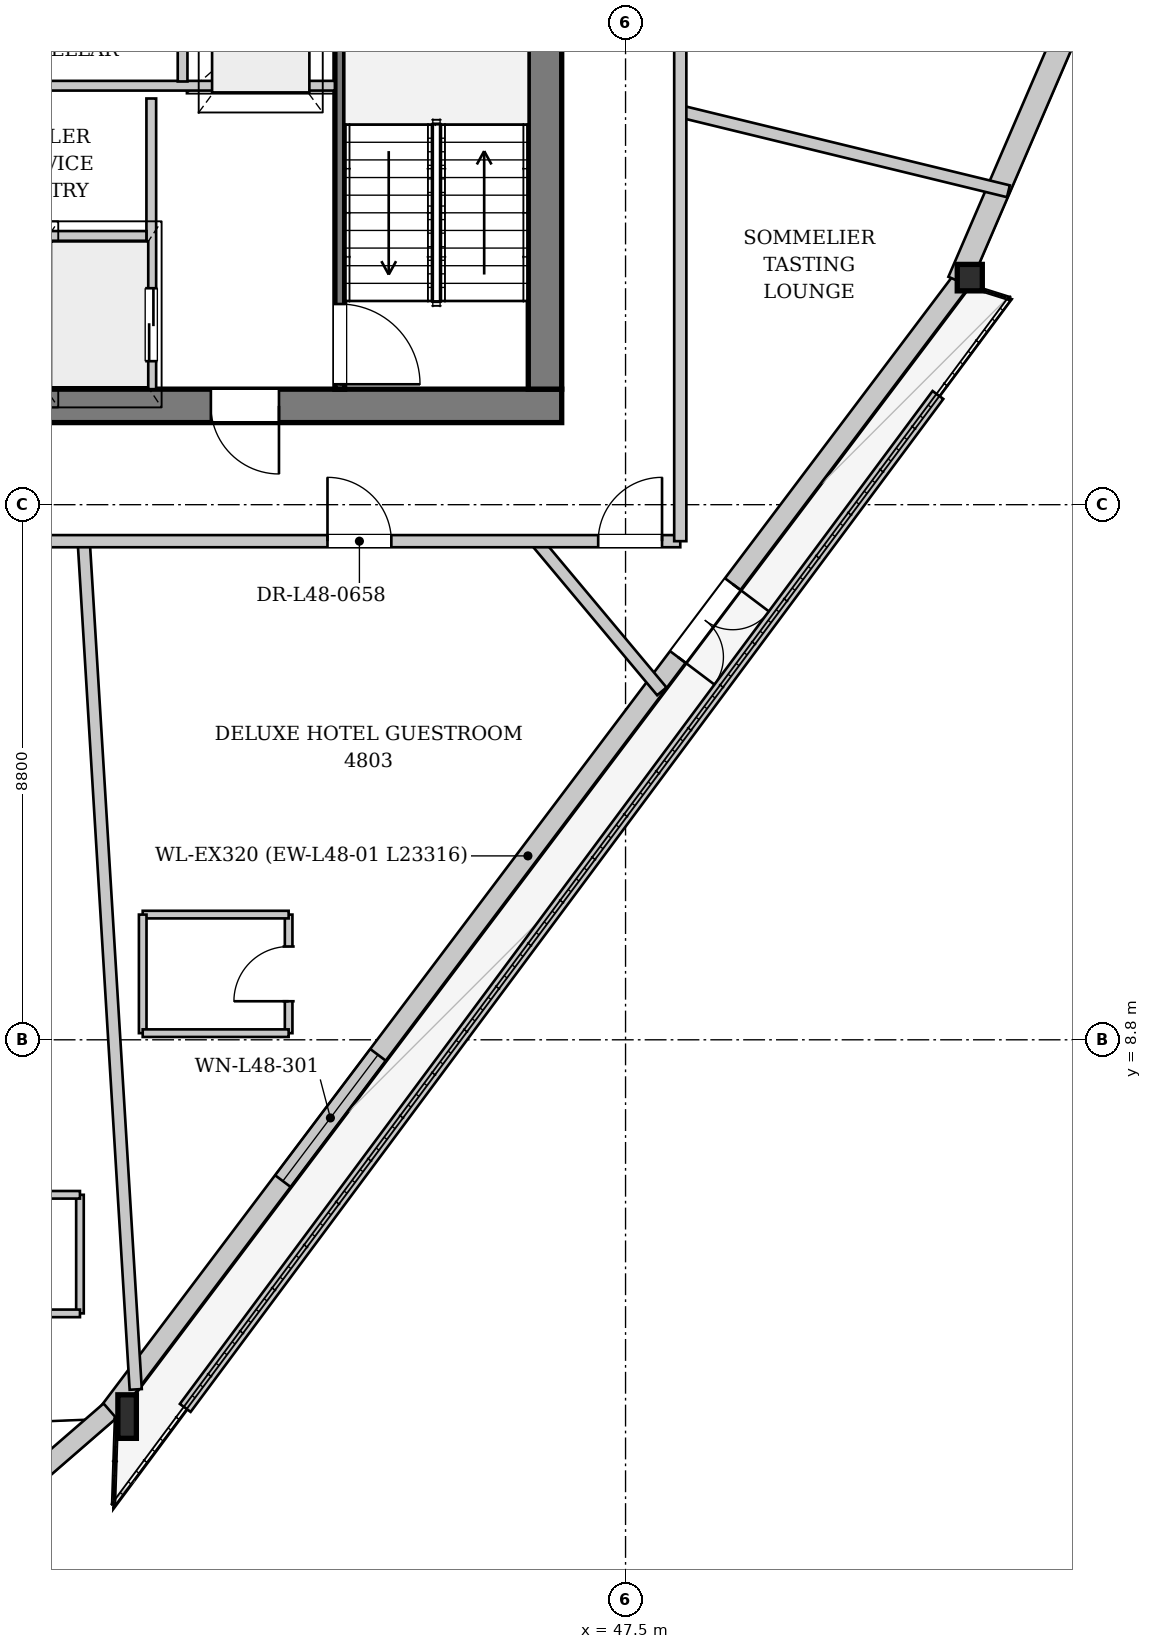
"""IFC4 building model, lengths in metres.
Left out: names, types, materials, properties, quantities, classifications, styles, units other than length and angle.
Written with IfcOpenShell. Run it as: python <this file> out.ifc"""

import sys

from ifc_helpers import new_model, si_unit, direction, frame, frame_2d, origin, origin_2d, place, context, subcontext, project, spatial, rectangle, i_section, extrude, source, transform, mapped, element, fill, save


model = new_model("IFC4")
c1 = context("Model", 3, precision=1e-05, world=origin(), true_north=direction((0.0, 1.0)))
c2 = subcontext(c1, "Body", "Model", "MODEL_VIEW")
j1 = project(units=[si_unit("LENGTHUNIT", "METRE"), si_unit("PLANEANGLEUNIT", "RADIAN")], contexts=[c1])
p1 = place(None, origin())
s1 = spatial("IfcSite", under=j1, at=p1, CompositionType="ELEMENT")
p2 = place(p1, origin())
s2 = spatial("IfcBuilding", under=s1, at=p2, CompositionType="ELEMENT")
p3 = place(p2, frame((0.0, 0.0, 182.1)))
s3 = spatial("IfcBuildingStorey", under=s2, at=p3, CompositionType="ELEMENT", Elevation=182.1)
m1 = source(origin(), c2, "Body", "SweptSolid", [
    extrude(i_section(OverallWidth=0.304, OverallDepth=0.716, WebThickness=0.021, FlangeThickness=0.04, at=origin_2d()), origin(), (0.0, 0.0, 1.0), 3.404),
])
p4 = place(p3, frame((39.125, 2.577, 0.0), z_axis=(0.104354873032, 0.01549185744, 0.994419460202), x_axis=(-0.146844314237, 0.989159616733, 0.0)))
e1 = element("IfcColumn", 1, at=p4, inside=s3, PredefinedType="COLUMN", context=c2, shape_type="MappedRepresentation", body=[
    mapped(m1, transform((0.0, 0.0, 0.0), x_axis=(1.0, 0.0, 0.0), y_axis=(0.0, 1.0, 0.0), z_axis=(0.0, 0.0, 1.0), scale=1.0)),
])
m2 = source(origin(), c2, "Body", "SweptSolid", [
    extrude(i_section(OverallWidth=0.412, OverallDepth=0.435, WebThickness=0.031, FlangeThickness=0.05, at=origin_2d()), origin(), (0.0, 0.0, 1.0), 3.396),
])
p5 = place(p3, frame((53.159, 21.197, 0.0), z_axis=(0.00136590655, 0.080516596624, 0.996752332311), x_axis=(-0.999856137556, 0.016961845191, 0.0)))
e2 = element("IfcColumn", 2, at=p5, inside=s3, PredefinedType="COLUMN", context=c2, shape_type="MappedRepresentation", body=[
    mapped(m2, transform((0.0, 0.0, 0.0), x_axis=(1.0, 0.0, 0.0), y_axis=(0.0, 1.0, 0.0), z_axis=(0.0, 0.0, 1.0), scale=1.0)),
])
p6 = place(p3, frame((53.031, 21.293, 0.0), z_axis=(0.0, 0.0, 1.0), x_axis=(-0.601886435851, -0.798581691713, 0.0)))
e3 = element("IfcWall", 3, at=p6, inside=s3, PredefinedType="SOLIDWALL", context=c2, shape_type="SweptSolid", body=[
    extrude(rectangle(XDim=23.316, YDim=0.32, at=frame_2d((11.658, 0.0))), origin(), (0.0, 0.0, 1.0), 2.722),
])
p7 = place(p6, frame((6.261, 0.0, 0.0)))
e4 = element("IfcOpeningElement", 4, at=p7, cuts=e3, PredefinedType="OPENING", context=c2, shape_type="SweptSolid", body=[
    extrude(rectangle(XDim=1.5, YDim=2.3, at=frame_2d((0.75, 1.15))), frame((0.0, 0.17, 0.0), z_axis=(0.0, -1.0, 0.0), x_axis=(1.0, 0.0, 0.0)), (0.0, 0.0, 1.0), 0.34),
])
p8 = place(p6, frame((15.954, 0.0, 0.252)))
e5 = element("IfcOpeningElement", 5, at=p8, cuts=e3, PredefinedType="OPENING", context=c2, shape_type="SweptSolid", body=[
    extrude(rectangle(XDim=2.6, YDim=2.35, at=frame_2d((1.3, 1.175))), frame((0.0, 0.17, 0.0), z_axis=(0.0, -1.0, 0.0), x_axis=(1.0, 0.0, 0.0)), (0.0, 0.0, 1.0), 0.34),
])
p9 = place(p3, frame((39.02, 2.698, 0.0), z_axis=(0.0, 0.0, 1.0), x_axis=(-0.755496043455, -0.65515320981, 0.0)))
e6 = element("IfcWall", 6, at=p9, inside=s3, PredefinedType="SOLIDWALL", context=c2, shape_type="SweptSolid", body=[
    extrude(rectangle(XDim=2.713, YDim=0.32, at=frame_2d((1.356, 0.0))), origin(), (0.0, 0.0, 1.0), 2.722),
])
p10 = place(p3, frame((62.205, 42.688, 0.0), z_axis=(0.0, 0.0, 1.0), x_axis=(-0.395471845497, -0.918478099586, 0.0)))
e7 = element("IfcWall", 7, at=p10, inside=s3, PredefinedType="SOLIDWALL", context=c2, shape_type="SweptSolid", body=[
    extrude(rectangle(XDim=23.316, YDim=0.38, at=frame_2d((11.658, 0.0))), origin(), (0.0, 0.0, 1.0), 2.722),
])
p11 = place(p10, frame((4.679, 0.0, 0.352)))
e8 = element("IfcOpeningElement", 8, at=p11, cuts=e7, PredefinedType="OPENING", context=c2, shape_type="SweptSolid", body=[
    extrude(rectangle(XDim=2.2, YDim=2.25, at=frame_2d((1.1, 1.125))), frame((0.0, 0.2, 0.0), z_axis=(0.0, -1.0, 0.0), x_axis=(1.0, 0.0, 0.0)), (0.0, 0.0, 1.0), 0.4),
])
p12 = place(p10, frame((15.688, 0.0, 0.352)))
e9 = element("IfcOpeningElement", 9, at=p12, cuts=e7, PredefinedType="OPENING", context=c2, shape_type="SweptSolid", body=[
    extrude(rectangle(XDim=2.2, YDim=2.25, at=frame_2d((1.1, 1.125))), frame((0.0, 0.2, 0.0), z_axis=(0.0, -1.0, 0.0), x_axis=(1.0, 0.0, 0.0)), (0.0, 0.0, 1.0), 0.4),
])
p13 = place(p3, frame((40.259, 2.746, 0.0), z_axis=(0.0, 0.0, 1.0), x_axis=(0.596468885173, 0.80263619967, 0.0)))
e10 = element("IfcWall", 10, at=p13, inside=s3, PredefinedType="PARAPET", context=c2, shape_type="SweptSolid", body=[
    extrude(rectangle(XDim=20.754, YDim=0.22, at=frame_2d((10.377, 0.0))), origin(), (0.0, 0.0, 1.0), 0.3),
])
p14 = place(p3, frame((46.45, 19.225, 0.0), z_axis=(0.0, 0.0, 1.0), x_axis=(-1.0, 0.0, 0.0)))
e11 = element("IfcWall", 11, at=p14, inside=s3, PredefinedType="SHEAR", context=c2, shape_type="SweptSolid", body=[
    extrude(rectangle(XDim=16.9, YDim=0.55, at=frame_2d((8.45, 0.0))), origin(), (0.0, 0.0, 1.0), 3.33),
])
p15 = place(p14, frame((4.65, 0.0, 0.0)))
e12 = element("IfcOpeningElement", 12, at=p15, cuts=e11, PredefinedType="OPENING", context=c2, shape_type="SweptSolid", body=[
    extrude(rectangle(XDim=1.12, YDim=2.25, at=frame_2d((0.56, 1.125))), frame((0.0, 0.285, 0.0), z_axis=(0.0, -1.0, 0.0), x_axis=(1.0, 0.0, 0.0)), (0.0, 0.0, 1.0), 0.57),
])
p16 = place(p14, frame((11.15, 0.0, 0.0)))
e13 = element("IfcOpeningElement", 13, at=p16, cuts=e11, PredefinedType="OPENING", context=c2, shape_type="SweptSolid", body=[
    extrude(rectangle(XDim=1.12, YDim=2.25, at=frame_2d((0.56, 1.125))), frame((0.0, 0.285, 0.0), z_axis=(0.0, -1.0, 0.0), x_axis=(1.0, 0.0, 0.0)), (0.0, 0.0, 1.0), 0.57),
])
p17 = place(p3, frame((46.175, 33.7, 0.0), z_axis=(0.0, 0.0, 1.0), x_axis=(0.0, -1.0, 0.0)))
e14 = element("IfcWall", 14, at=p17, inside=s3, PredefinedType="SHEAR", context=c2, shape_type="SweptSolid", body=[
    extrude(rectangle(XDim=14.2, YDim=0.55, at=frame_2d((7.1, 0.0))), origin(), (0.0, 0.0, 1.0), 3.33),
])
p18 = place(p17, frame((5.18, 0.0, 0.0)))
e15 = element("IfcOpeningElement", 15, at=p18, cuts=e14, PredefinedType="OPENING", context=c2, shape_type="SweptSolid", body=[
    extrude(rectangle(XDim=1.6, YDim=2.2, at=frame_2d((0.8, 1.1))), frame((0.0, 0.285, 0.0), z_axis=(0.0, -1.0, 0.0), x_axis=(1.0, 0.0, 0.0)), (0.0, 0.0, 1.0), 0.57),
])
p19 = place(p17, frame((2.05, 0.0, 0.0)))
e16 = element("IfcOpeningElement", 16, at=p19, cuts=e14, PredefinedType="OPENING", context=c2, shape_type="SweptSolid", body=[
    extrude(rectangle(XDim=0.95, YDim=2.1, at=frame_2d((0.475, 1.05))), frame((0.0, 0.285, 0.0), z_axis=(0.0, -1.0, 0.0), x_axis=(1.0, 0.0, 0.0)), (0.0, 0.0, 1.0), 0.57),
])
p20 = place(p3, frame((42.8, 26.96, 0.0), z_axis=(0.0, 0.0, 1.0), x_axis=(0.0, -1.0, 0.0)))
e17 = element("IfcWall", 17, at=p20, inside=s3, PredefinedType="PARTITIONING", context=c2, shape_type="SweptSolid", body=[
    extrude(rectangle(XDim=7.46, YDim=0.16, at=frame_2d((3.73, 0.0))), origin(), (0.0, 0.0, 1.0), 3.33),
])
p21 = place(p20, frame((6.06, 0.0, 0.0)))
e18 = element("IfcOpeningElement", 18, at=p21, cuts=e17, PredefinedType="OPENING", context=c2, shape_type="SweptSolid", body=[
    extrude(rectangle(XDim=1.32, YDim=2.2, at=frame_2d((0.66, 1.1))), frame((0.0, 0.09, 0.0), z_axis=(0.0, -1.0, 0.0), x_axis=(1.0, 0.0, 0.0)), (0.0, 0.0, 1.0), 0.18),
])
p22 = place(p3, frame((39.7, 24.28, 0.0), z_axis=(0.0, 0.0, 1.0), x_axis=(0.0, -1.0, 0.0)))
e19 = element("IfcWall", 19, at=p22, inside=s3, PredefinedType="PARTITIONING", context=c2, shape_type="SweptSolid", body=[
    extrude(rectangle(XDim=4.78, YDim=0.16, at=frame_2d((2.39, 0.0))), origin(), (0.0, 0.0, 1.0), 3.33),
])
p23 = place(p22, frame((3.12, 0.0, 0.0)))
e20 = element("IfcOpeningElement", 20, at=p23, cuts=e19, PredefinedType="OPENING", context=c2, shape_type="SweptSolid", body=[
    extrude(rectangle(XDim=1.2, YDim=2.2, at=frame_2d((0.6, 1.1))), frame((0.0, 0.09, 0.0), z_axis=(0.0, -1.0, 0.0), x_axis=(1.0, 0.0, 0.0)), (0.0, 0.0, 1.0), 0.18),
])
p24 = place(p3, frame((36.38, 22.02, 0.0), z_axis=(0.0, 0.0, 1.0), x_axis=(1.0, 0.0, 0.0)))
e21 = element("IfcWall", 21, at=p24, inside=s3, PredefinedType="PARTITIONING", context=c2, shape_type="SweptSolid", body=[
    extrude(rectangle(XDim=3.24, YDim=0.16, at=frame_2d((1.62, 0.0))), origin(), (0.0, 0.0, 1.0), 3.33),
])
p25 = place(p3, frame((33.28, 24.49, 0.0), z_axis=(0.0, 0.0, 1.0), x_axis=(1.0, 0.0, 0.0)))
e22 = element("IfcWall", 22, at=p25, inside=s3, PredefinedType="PARTITIONING", context=c2, shape_type="SweptSolid", body=[
    extrude(rectangle(XDim=9.44, YDim=0.16, at=frame_2d((4.72, 0.0))), origin(), (0.0, 0.0, 1.0), 3.33),
])
p26 = place(p3, frame((40.215, 24.56, 0.0), z_axis=(0.0, 0.0, 1.0), x_axis=(0.0, 1.0, 0.0)))
e23 = element("IfcWall", 23, at=p26, inside=s3, PredefinedType="PARTITIONING", context=c2, shape_type="SweptSolid", body=[
    extrude(rectangle(XDim=2.31, YDim=0.16, at=frame_2d((1.155, 0.0))), origin(), (0.0, 0.0, 1.0), 3.33),
])
p27 = place(p3, frame((38.589, 17.0, 0.0), z_axis=(0.0, 0.0, 1.0), x_axis=(0.061210221515, -0.998124896384, 0.0)))
e24 = element("IfcWall", 24, at=p27, inside=s3, PredefinedType="PARTITIONING", context=c2, shape_type="SweptSolid", body=[
    extrude(rectangle(XDim=13.976, YDim=0.2, at=frame_2d((6.988, 0.0))), origin(), (0.0, 0.0, 1.0), 3.005),
])
p28 = place(p3, frame((46.031, 17.0, 0.0), z_axis=(0.0, 0.0, 1.0), x_axis=(0.641652542472, -0.766995446361, 0.0)))
e25 = element("IfcWall", 25, at=p28, inside=s3, PredefinedType="PARTITIONING", context=c2, shape_type="SweptSolid", body=[
    extrude(rectangle(XDim=3.22, YDim=0.2, at=frame_2d((1.61, 0.0))), origin(), (0.0, 0.0, 1.0), 3.33),
])
p29 = place(p3, frame((48.4, 24.068, 0.0), z_axis=(0.0, 0.0, 1.0), x_axis=(0.971626118901, -0.23652206043, 0.0)))
e26 = element("IfcWall", 26, at=p29, inside=s3, PredefinedType="PARTITIONING", context=c2, shape_type="SweptSolid", body=[
    extrude(rectangle(XDim=5.554, YDim=0.2, at=frame_2d((2.777, 0.0))), origin(), (0.0, 0.0, 1.0), 3.33),
])
p30 = place(p3, frame((38.527, 4.301, 0.0), z_axis=(0.0, 0.0, 1.0), x_axis=(0.0, 1.0, 0.0)))
e27 = element("IfcWall", 27, at=p30, inside=s3, PredefinedType="PARTITIONING", context=c2, shape_type="SweptSolid", body=[
    extrude(rectangle(XDim=1.95, YDim=0.125, at=frame_2d((0.975, 0.0))), origin(), (0.0, 0.0, 1.0), 3.33),
])
p31 = place(p3, frame((38.527, 6.251, 0.0), z_axis=(0.0, 0.0, 1.0), x_axis=(-1.0, 0.0, 0.0)))
e28 = element("IfcWall", 28, at=p31, inside=s3, PredefinedType="PARTITIONING", context=c2, shape_type="SweptSolid", body=[
    extrude(rectangle(XDim=2.4, YDim=0.125, at=frame_2d((1.2, 0.0))), origin(), (0.0, 0.0, 1.0), 3.33),
])
p32 = place(p31, frame((0.75, 0.0, 0.0)))
e29 = element("IfcOpeningElement", 29, at=p32, cuts=e28, PredefinedType="OPENING", context=c2, shape_type="SweptSolid", body=[
    extrude(rectangle(XDim=0.9, YDim=2.1, at=frame_2d((0.45, 1.05))), frame((0.0, 0.073, 0.0), z_axis=(0.0, -1.0, 0.0), x_axis=(1.0, 0.0, 0.0)), (0.0, 0.0, 1.0), 0.145),
])
p33 = place(p3, frame((36.127, 4.301, 0.0), z_axis=(0.0, 0.0, 1.0), x_axis=(1.0, 0.0, 0.0)))
e30 = element("IfcWall", 30, at=p33, inside=s3, PredefinedType="PARTITIONING", context=c2, shape_type="SweptSolid", body=[
    extrude(rectangle(XDim=2.4, YDim=0.125, at=frame_2d((1.2, 0.0))), origin(), (0.0, 0.0, 1.0), 3.33),
])
p34 = place(p3, frame((41.959, 8.909, 0.0), z_axis=(0.0, 0.0, 1.0), x_axis=(0.0, 1.0, 0.0)))
e31 = element("IfcWall", 31, at=p34, inside=s3, PredefinedType="PARTITIONING", context=c2, shape_type="SweptSolid", body=[
    extrude(rectangle(XDim=1.95, YDim=0.125, at=frame_2d((0.975, 0.0))), origin(), (0.0, 0.0, 1.0), 3.33),
])
p35 = place(p34, frame((0.525, 0.0, 0.0)))
e32 = element("IfcOpeningElement", 32, at=p35, cuts=e31, PredefinedType="OPENING", context=c2, shape_type="SweptSolid", body=[
    extrude(rectangle(XDim=0.9, YDim=2.1, at=frame_2d((0.45, 1.05))), frame((0.0, 0.073, 0.0), z_axis=(0.0, -1.0, 0.0), x_axis=(1.0, 0.0, 0.0)), (0.0, 0.0, 1.0), 0.145),
])
p36 = place(p3, frame((41.959, 10.859, 0.0), z_axis=(0.0, 0.0, 1.0), x_axis=(-1.0, 0.0, 0.0)))
e33 = element("IfcWall", 33, at=p36, inside=s3, PredefinedType="PARTITIONING", context=c2, shape_type="SweptSolid", body=[
    extrude(rectangle(XDim=2.4, YDim=0.125, at=frame_2d((1.2, 0.0))), origin(), (0.0, 0.0, 1.0), 3.33),
])
p37 = place(p3, frame((39.559, 10.859, 0.0), z_axis=(0.0, 0.0, 1.0), x_axis=(0.0, -1.0, 0.0)))
e34 = element("IfcWall", 34, at=p37, inside=s3, PredefinedType="PARTITIONING", context=c2, shape_type="SweptSolid", body=[
    extrude(rectangle(XDim=1.95, YDim=0.125, at=frame_2d((0.975, 0.0))), origin(), (0.0, 0.0, 1.0), 3.33),
])
p38 = place(p3, frame((39.559, 8.909, 0.0), z_axis=(0.0, 0.0, 1.0), x_axis=(1.0, 0.0, 0.0)))
e35 = element("IfcWall", 35, at=p38, inside=s3, PredefinedType="PARTITIONING", context=c2, shape_type="SweptSolid", body=[
    extrude(rectangle(XDim=2.4, YDim=0.125, at=frame_2d((1.2, 0.0))), origin(), (0.0, 0.0, 1.0), 3.33),
])
p39 = place(p3, frame((27.6, 17.0, 0.0), z_axis=(0.0, 0.0, 1.0), x_axis=(1.0, 0.0, 0.0)))
e36 = element("IfcWall", 36, at=p39, inside=s3, PredefinedType="PARTITIONING", context=c2, shape_type="SweptSolid", body=[
    extrude(rectangle(XDim=20.8, YDim=0.2, at=frame_2d((10.4, 0.0))), origin(), (0.0, 0.0, 1.0), 3.33),
])
p40 = place(p39, frame((0.3, 0.0, 0.0)))
e37 = element("IfcOpeningElement", 37, at=p40, cuts=e36, PredefinedType="OPENING", context=c2, shape_type="SweptSolid", body=[
    extrude(rectangle(XDim=1.05, YDim=2.2, at=frame_2d((0.525, 1.1))), frame((0.0, 0.11, 0.0), z_axis=(0.0, -1.0, 0.0), x_axis=(1.0, 0.0, 0.0)), (0.0, 0.0, 1.0), 0.22),
])
p41 = place(p39, frame((6.215, 0.0, 0.0)))
e38 = element("IfcOpeningElement", 38, at=p41, cuts=e36, PredefinedType="OPENING", context=c2, shape_type="SweptSolid", body=[
    extrude(rectangle(XDim=1.05, YDim=2.2, at=frame_2d((0.525, 1.1))), frame((0.0, 0.11, 0.0), z_axis=(0.0, -1.0, 0.0), x_axis=(1.0, 0.0, 0.0)), (0.0, 0.0, 1.0), 0.22),
])
p42 = place(p39, frame((14.998, 0.0, 0.0)))
e39 = element("IfcOpeningElement", 39, at=p42, cuts=e36, PredefinedType="OPENING", context=c2, shape_type="SweptSolid", body=[
    extrude(rectangle(XDim=1.05, YDim=2.2, at=frame_2d((0.525, 1.1))), frame((0.0, 0.11, 0.0), z_axis=(0.0, -1.0, 0.0), x_axis=(1.0, 0.0, 0.0)), (0.0, 0.0, 1.0), 0.22),
])
p43 = place(p39, frame((19.45, 0.0, 0.0)))
e40 = element("IfcOpeningElement", 40, at=p43, cuts=e36, PredefinedType="OPENING", context=c2, shape_type="SweptSolid", body=[
    extrude(rectangle(XDim=1.05, YDim=2.2, at=frame_2d((0.525, 1.1))), frame((0.0, 0.11, 0.0), z_axis=(0.0, -1.0, 0.0), x_axis=(1.0, 0.0, 0.0)), (0.0, 0.0, 1.0), 0.22),
])
p44 = place(p3, frame((48.4, 17.0, 0.0), z_axis=(0.0, 0.0, 1.0), x_axis=(0.0, 1.0, 0.0)))
e41 = element("IfcWall", 41, at=p44, inside=s3, PredefinedType="PARTITIONING", context=c2, shape_type="SweptSolid", body=[
    extrude(rectangle(XDim=19.2, YDim=0.2, at=frame_2d((9.6, 0.0))), origin(), (0.0, 0.0, 1.0), 3.33),
])
p45 = place(p44, frame((9.478, 0.0, 0.0)))
e42 = element("IfcOpeningElement", 42, at=p45, cuts=e41, PredefinedType="OPENING", context=c2, shape_type="SweptSolid", body=[
    extrude(rectangle(XDim=1.05, YDim=2.2, at=frame_2d((0.525, 1.1))), frame((0.0, 0.11, 0.0), z_axis=(0.0, -1.0, 0.0), x_axis=(1.0, 0.0, 0.0)), (0.0, 0.0, 1.0), 0.22),
])
m3 = source(origin(), c2, "Body", "SweptSolid", [
    extrude(rectangle(XDim=1.5, YDim=2.3, at=frame_2d((0.75, 1.15))), frame((0.0, 0.025, 0.0), z_axis=(0.0, -1.0, 0.0), x_axis=(1.0, 0.0, 0.0)), (0.0, 0.0, 1.0), 0.05),
])
p46 = place(p7, origin())
e43 = element("IfcDoor", 43, at=p46, inside=s3, OperationType="DOUBLE_DOOR_SINGLE_SWING", PredefinedType="DOOR", context=c2, shape_type="MappedRepresentation", body=[
    mapped(m3, transform((0.0, 0.0, 0.0), x_axis=(1.0, 0.0, 0.0), y_axis=(0.0, 1.0, 0.0), z_axis=(0.0, 0.0, 1.0), scale=1.0)),
])
fill(e4, e43)
m4 = source(origin(), c2, "Body", "SweptSolid", [
    extrude(rectangle(XDim=2.6, YDim=2.35, at=frame_2d((1.3, 1.175))), frame((0.0, 0.03, 0.0), z_axis=(0.0, -1.0, 0.0), x_axis=(1.0, 0.0, 0.0)), (0.0, 0.0, 1.0), 0.06),
])
p47 = place(p8, origin())
e44 = element("IfcWindow", 44, at=p47, inside=s3, PartitioningType="SINGLE_PANEL", PredefinedType="WINDOW", context=c2, shape_type="MappedRepresentation", body=[
    mapped(m4, transform((0.0, 0.0, 0.0), x_axis=(1.0, 0.0, 0.0), y_axis=(0.0, 1.0, 0.0), z_axis=(0.0, 0.0, 1.0), scale=1.0)),
])
fill(e5, e44)
m5 = source(origin(), c2, "Body", "SweptSolid", [
    extrude(rectangle(XDim=1.12, YDim=2.25, at=frame_2d((0.56, 1.125))), frame((0.0, 0.025, 0.0), z_axis=(0.0, -1.0, 0.0), x_axis=(1.0, 0.0, 0.0)), (0.0, 0.0, 1.0), 0.05),
])
p48 = place(p15, origin())
e45 = element("IfcDoor", 45, at=p48, inside=s3, OperationType="SINGLE_SWING_LEFT", PredefinedType="DOOR", context=c2, shape_type="MappedRepresentation", body=[
    mapped(m5, transform((0.0, 0.0, 0.0), x_axis=(1.0, 0.0, 0.0), y_axis=(0.0, 1.0, 0.0), z_axis=(0.0, 0.0, 1.0), scale=1.0)),
])
fill(e12, e45)
m6 = source(origin(), c2, "Body", "SweptSolid", [
    extrude(rectangle(XDim=1.32, YDim=2.2, at=frame_2d((0.66, 1.1))), frame((0.0, 0.025, 0.0), z_axis=(0.0, -1.0, 0.0), x_axis=(1.0, 0.0, 0.0)), (0.0, 0.0, 1.0), 0.05),
])
p49 = place(p21, origin())
e46 = element("IfcDoor", 46, at=p49, inside=s3, OperationType="SINGLE_SWING_RIGHT", PredefinedType="DOOR", context=c2, shape_type="MappedRepresentation", body=[
    mapped(m6, transform((0.0, 0.0, 0.0), x_axis=(1.0, 0.0, 0.0), y_axis=(0.0, 1.0, 0.0), z_axis=(0.0, 0.0, 1.0), scale=1.0)),
])
fill(e18, e46)
m7 = source(origin(), c2, "Body", "SweptSolid", [
    extrude(rectangle(XDim=1.2, YDim=2.2, at=frame_2d((0.6, 1.1))), frame((0.0, 0.025, 0.0), z_axis=(0.0, -1.0, 0.0), x_axis=(1.0, 0.0, 0.0)), (0.0, 0.0, 1.0), 0.05),
])
p50 = place(p23, origin())
e47 = element("IfcDoor", 47, at=p50, inside=s3, OperationType="DOUBLE_DOOR_SLIDING", PredefinedType="DOOR", context=c2, shape_type="MappedRepresentation", body=[
    mapped(m7, transform((0.0, 0.0, 0.0), x_axis=(1.0, 0.0, 0.0), y_axis=(0.0, 1.0, 0.0), z_axis=(0.0, 0.0, 1.0), scale=1.0)),
])
fill(e20, e47)
m8 = source(origin(), c2, "Body", "SweptSolid", [
    extrude(rectangle(XDim=0.9, YDim=2.1, at=frame_2d((0.45, 1.05))), frame((0.0, 0.025, 0.0), z_axis=(0.0, -1.0, 0.0), x_axis=(1.0, 0.0, 0.0)), (0.0, 0.0, 1.0), 0.05),
])
p51 = place(p35, origin())
e48 = element("IfcDoor", 48, at=p51, inside=s3, OperationType="SINGLE_SWING_LEFT", PredefinedType="DOOR", context=c2, shape_type="MappedRepresentation", body=[
    mapped(m8, transform((0.0, 0.0, 0.0), x_axis=(1.0, 0.0, 0.0), y_axis=(0.0, 1.0, 0.0), z_axis=(0.0, 0.0, 1.0), scale=1.0)),
])
fill(e32, e48)
m9 = source(origin(), c2, "Body", "SweptSolid", [
    extrude(rectangle(XDim=1.05, YDim=2.2, at=frame_2d((0.525, 1.1))), frame((0.0, 0.025, 0.0), z_axis=(0.0, -1.0, 0.0), x_axis=(1.0, 0.0, 0.0)), (0.0, 0.0, 1.0), 0.05),
])
p52 = place(p42, origin())
e49 = element("IfcDoor", 49, at=p52, inside=s3, OperationType="SINGLE_SWING_LEFT", PredefinedType="DOOR", context=c2, shape_type="MappedRepresentation", body=[
    mapped(m9, transform((0.0, 0.0, 0.0), x_axis=(1.0, 0.0, 0.0), y_axis=(0.0, 1.0, 0.0), z_axis=(0.0, 0.0, 1.0), scale=1.0)),
])
fill(e39, e49)
p53 = place(p43, origin())
e50 = element("IfcDoor", 50, at=p53, inside=s3, OperationType="SINGLE_SWING_RIGHT", PredefinedType="DOOR", context=c2, shape_type="MappedRepresentation", body=[
    mapped(m9, transform((0.0, 0.0, 0.0), x_axis=(1.0, 0.0, 0.0), y_axis=(0.0, 1.0, 0.0), z_axis=(0.0, 0.0, 1.0), scale=1.0)),
])
fill(e40, e50)
save(model, sys.argv[1])
